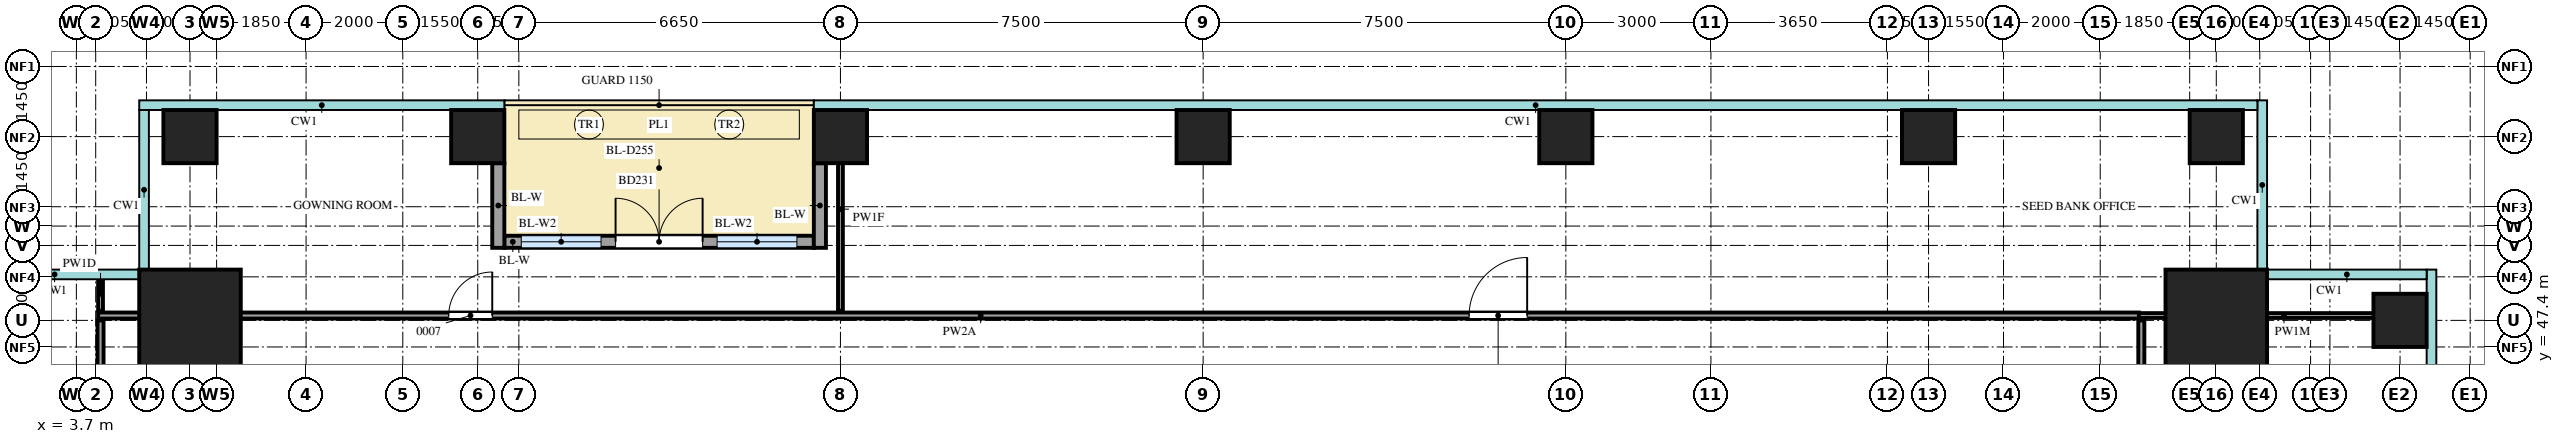
"""IFC4 building model, lengths in metres.
Left out: names, types, materials, properties, quantities, classifications, styles, units other than length and angle.
Written with IfcOpenShell. Run it as: python <this file> out.ifc"""

import sys

from ifc_helpers import new_model, si_unit, direction, frame, frame_2d, origin, origin_2d, place, context, subcontext, project, spatial, rectangle, extrude, source, transform, mapped, element, fill, save


model = new_model("IFC4")
c1 = context("Model", 3, precision=1e-05, world=origin(), true_north=direction((0.0, 1.0)))
c2 = subcontext(c1, "Body", "Model", "MODEL_VIEW")
j1 = project(units=[si_unit("LENGTHUNIT", "METRE"), si_unit("PLANEANGLEUNIT", "RADIAN")], contexts=[c1])
p1 = place(None, origin())
s1 = spatial("IfcSite", under=j1, at=p1, CompositionType="ELEMENT")
p2 = place(p1, origin())
s2 = spatial("IfcBuilding", under=s1, at=p2, CompositionType="ELEMENT")
p3 = place(p2, frame((0.0, 0.0, 110.3)))
s3 = spatial("IfcBuildingStorey", under=s2, at=p3, CompositionType="ELEMENT", Elevation=110.3)
m1 = source(origin(), c2, "Body", "SweptSolid", [
    extrude(rectangle(XDim=2.1, YDim=2.1, at=origin_2d()), origin(), (0.0, 0.0, 1.0), 4.4),
])
for number, where, z_axis, x_axis in (
    (1, (47.95, 47.95, 0.0), (0.0, 0.0, 1.0), (1.0, 0.0, 0.0)),
    (2, (6.05, 47.95, 0.0), (0.0, 0.0, 1.0), (1.0, 0.0, 0.0)),
):
    element("IfcColumn", number, at=place(p3, frame(where, z_axis=z_axis, x_axis=x_axis)), inside=s3, PredefinedType="COLUMN", context=c2, shape_type="MappedRepresentation", body=[
        mapped(m1, transform((0.0, 0.0, 0.0))),
    ])
m2 = source(origin(), c2, "Body", "SweptSolid", [
    extrude(rectangle(XDim=1.1, YDim=1.1, at=origin_2d()), origin(), (0.0, 0.0, 1.0), 4.1),
])
for number, where, z_axis, x_axis in (
    (3, (51.75, 47.95, 0.0), (0.0, 0.0, 1.0), (1.0, 0.0, 0.0)),
    (4, (6.05, 51.75, 0.0), (0.0, 0.0, 1.0), (1.0, 0.0, 0.0)),
    (5, (12.0, 51.75, 0.0), (0.0, 0.0, 1.0), (1.0, 0.0, 0.0)),
    (6, (19.5, 51.75, 0.0), (0.0, 0.0, 1.0), (1.0, 0.0, 0.0)),
    (7, (27.0, 51.75, 0.0), (0.0, 0.0, 1.0), (1.0, 0.0, 0.0)),
    (8, (34.5, 51.75, 0.0), (0.0, 0.0, 1.0), (1.0, 0.0, 0.0)),
    (9, (42.0, 51.75, 0.0), (0.0, 0.0, 1.0), (1.0, 0.0, 0.0)),
    (10, (47.95, 51.75, 0.0), (0.0, 0.0, 1.0), (1.0, 0.0, 0.0)),
):
    element("IfcColumn", number, at=place(p3, frame(where, z_axis=z_axis, x_axis=x_axis)), inside=s3, PredefinedType="COLUMN", context=c2, shape_type="MappedRepresentation", body=[
        mapped(m2, transform((0.0, 0.0, 0.0))),
    ])
m3 = source(origin(), c2, "Body", "SweptSolid", [
    extrude(rectangle(XDim=6.4, YDim=0.25, at=frame_2d((3.2, 0.0))), origin(), (0.0, 0.0, 1.0), 4.1),
])
p4 = place(p3, frame((12.55, 49.575, 0.0), z_axis=(0.0, 0.0, 1.0), x_axis=(1.0, 0.0, 0.0)))
e11 = element("IfcWall", 11, at=p4, inside=s3, PredefinedType="SOLIDWALL", context=c2, shape_type="MappedRepresentation", body=[
    mapped(m3, transform((0.0, 0.0, 0.0))),
])
m4 = source(origin(), c2, "Body", "SweptSolid", [
    extrude(rectangle(XDim=1.65, YDim=2.4, at=frame_2d((0.825, 1.2))), frame((0.0, 0.135, 0.0), z_axis=(0.0, -1.0, 0.0), x_axis=(1.0, 0.0, 0.0)), (0.0, 0.0, 1.0), 0.27),
])
p5 = place(p4, frame((0.35, 0.0, 0.0)))
e12 = element("IfcOpeningElement", 12, at=p5, cuts=e11, PredefinedType="OPENING", context=c2, shape_type="MappedRepresentation", body=[
    mapped(m4, transform((0.0, 0.0, 0.0))),
])
p6 = place(p4, frame((4.4, 0.0, 0.0)))
e13 = element("IfcOpeningElement", 13, at=p6, cuts=e11, PredefinedType="OPENING", context=c2, shape_type="MappedRepresentation", body=[
    mapped(m4, transform((0.0, 0.0, 0.0))),
])
m5 = source(origin(), c2, "Body", "SweptSolid", [
    extrude(rectangle(XDim=1.8, YDim=2.4, at=frame_2d((0.9, 1.2))), frame((0.0, 0.135, 0.0), z_axis=(0.0, -1.0, 0.0), x_axis=(1.0, 0.0, 0.0)), (0.0, 0.0, 1.0), 0.27),
])
p7 = place(p4, frame((2.3, 0.0, 0.0)))
e14 = element("IfcOpeningElement", 14, at=p7, cuts=e11, PredefinedType="OPENING", context=c2, shape_type="MappedRepresentation", body=[
    mapped(m5, transform((0.0, 0.0, 0.0))),
])
m6 = source(origin(), c2, "Body", "SweptSolid", [
    extrude(rectangle(XDim=1.75, YDim=0.25, at=frame_2d((0.875, 0.0))), origin(), (0.0, 0.0, 1.0), 4.1),
])
for number, where, z_axis, x_axis in (
    (15, (12.425, 51.2, 0.0), (0.0, 0.0, 1.0), (0.0, -1.0, 0.0)),
    (16, (19.075, 51.2, 0.0), (0.0, 0.0, 1.0), (0.0, -1.0, 0.0)),
):
    element("IfcWall", number, at=place(p3, frame(where, z_axis=z_axis, x_axis=x_axis)), inside=s3, PredefinedType="SOLIDWALL", context=c2, shape_type="MappedRepresentation", body=[
        mapped(m6, transform((0.0, 0.0, 0.0))),
    ])
m7 = source(origin(), c2, "Body", "SweptSolid", [
    extrude(rectangle(XDim=41.8, YDim=0.125, at=frame_2d((20.9, 0.0))), origin(), (0.0, 0.0, 1.0), 4.2),
])
p8 = place(p3, frame((4.2, 6.15, 0.0), z_axis=(0.0, 0.0, 1.0), x_axis=(0.0, 1.0, 0.0)))
e17 = element("IfcWall", 17, at=p8, inside=s3, PredefinedType="PARTITIONING", context=c2, shape_type="MappedRepresentation", body=[
    mapped(m7, transform((0.0, 0.0, 0.0))),
])
m8 = source(origin(), c2, "Body", "SweptSolid", [
    extrude(rectangle(XDim=0.9, YDim=2.1, at=frame_2d((0.45, 1.05))), frame((0.0, 0.073, 0.0), z_axis=(0.0, -1.0, 0.0), x_axis=(1.0, 0.0, 0.0)), (0.0, 0.0, 1.0), 0.145),
])
p9 = place(p8, frame((7.2, 0.0, 0.0)))
e18 = element("IfcOpeningElement", 18, at=p9, cuts=e17, PredefinedType="OPENING", context=c2, shape_type="MappedRepresentation", body=[
    mapped(m8, transform((0.0, 0.0, 0.0))),
])
p10 = place(p8, frame((21.8, 0.0, 0.0)))
e19 = element("IfcOpeningElement", 19, at=p10, cuts=e17, PredefinedType="OPENING", context=c2, shape_type="MappedRepresentation", body=[
    mapped(m8, transform((0.0, 0.0, 0.0))),
])
p11 = place(p8, frame((33.3, 0.0, 0.0)))
e20 = element("IfcOpeningElement", 20, at=p11, cuts=e17, PredefinedType="OPENING", context=c2, shape_type="MappedRepresentation", body=[
    mapped(m8, transform((0.0, 0.0, 0.0))),
])
m9 = source(origin(), c2, "Body", "SweptSolid", [
    extrude(rectangle(XDim=37.65, YDim=0.125, at=frame_2d((18.825, 0.0))), origin(), (0.0, 0.0, 1.0), 4.2),
])
p12 = place(p3, frame((46.4, 10.3, 0.0), z_axis=(0.0, 0.0, 1.0), x_axis=(0.0, 1.0, 0.0)))
e21 = element("IfcWall", 21, at=p12, inside=s3, PredefinedType="PARTITIONING", context=c2, shape_type="MappedRepresentation", body=[
    mapped(m9, transform((0.0, 0.0, 0.0))),
])
m10 = source(origin(), c2, "Body", "SweptSolid", [
    extrude(rectangle(XDim=1.2, YDim=2.1, at=frame_2d((0.6, 1.05))), frame((0.0, 0.073, 0.0), z_axis=(0.0, -1.0, 0.0), x_axis=(1.0, 0.0, 0.0)), (0.0, 0.0, 1.0), 0.145),
])
p13 = place(p12, frame((7.85, 0.0, 0.0)))
e22 = element("IfcOpeningElement", 22, at=p13, cuts=e21, PredefinedType="OPENING", context=c2, shape_type="MappedRepresentation", body=[
    mapped(m10, transform((0.0, 0.0, 0.0))),
])
p14 = place(p12, frame((23.6, 0.0, 0.0)))
e23 = element("IfcOpeningElement", 23, at=p14, cuts=e21, PredefinedType="OPENING", context=c2, shape_type="MappedRepresentation", body=[
    mapped(m10, transform((0.0, 0.0, 0.0))),
])
p15 = place(p12, frame((32.9, 0.0, 0.0)))
e24 = element("IfcOpeningElement", 24, at=p15, cuts=e21, PredefinedType="OPENING", context=c2, shape_type="MappedRepresentation", body=[
    mapped(m10, transform((0.0, 0.0, 0.0))),
])
m11 = source(origin(), c2, "Body", "SweptSolid", [
    extrude(rectangle(XDim=42.2, YDim=0.125, at=frame_2d((21.1, 0.0))), origin(), (0.0, 0.0, 1.0), 3.55),
])
p16 = place(p3, frame((4.15, 48.05, 0.0), z_axis=(0.0, 0.0, 1.0), x_axis=(1.0, 0.0, 0.0)))
e25 = element("IfcWall", 25, at=p16, inside=s3, PredefinedType="PARTITIONING", context=c2, shape_type="MappedRepresentation", body=[
    mapped(m11, transform((0.0, 0.0, 0.0))),
])
p17 = place(p16, frame((7.25, 0.0, 0.0)))
e26 = element("IfcOpeningElement", 26, at=p17, cuts=e25, PredefinedType="OPENING", context=c2, shape_type="MappedRepresentation", body=[
    mapped(m8, transform((0.0, 0.0, 0.0))),
])
p18 = place(p16, frame((28.35, 0.0, 0.0)))
e27 = element("IfcOpeningElement", 27, at=p18, cuts=e25, PredefinedType="OPENING", context=c2, shape_type="MappedRepresentation", body=[
    mapped(m10, transform((0.0, 0.0, 0.0))),
])
m12 = source(origin(), c2, "Body", "SweptSolid", [
    extrude(rectangle(XDim=6.0, YDim=0.1, at=frame_2d((3.0, 0.0))), origin(), (0.0, 0.0, 1.0), 3.55),
])
p19 = place(p3, frame((46.35, 48.05, 0.0), z_axis=(0.0, 0.0, 1.0), x_axis=(1.0, 0.0, 0.0)))
e28 = element("IfcWall", 28, at=p19, inside=s3, PredefinedType="PARTITIONING", context=c2, shape_type="MappedRepresentation", body=[
    mapped(m12, transform((0.0, 0.0, 0.0))),
])
m13 = source(origin(), c2, "Body", "SweptSolid", [
    extrude(rectangle(XDim=0.7, YDim=0.1, at=frame_2d((0.35, 0.0))), origin(), (0.0, 0.0, 1.0), 4.2),
])
p20 = place(p3, frame((4.2, 48.15, 0.0), z_axis=(0.0, 0.0, 1.0), x_axis=(0.0, 1.0, 0.0)))
e29 = element("IfcWall", 29, at=p20, inside=s3, PredefinedType="PARTITIONING", context=c2, shape_type="MappedRepresentation", body=[
    mapped(m13, transform((0.0, 0.0, 0.0))),
])
m14 = source(origin(), c2, "Body", "SweptSolid", [
    extrude(rectangle(XDim=4.2, YDim=0.1, at=frame_2d((2.1, 0.0))), origin(), (0.0, 0.0, 1.0), 3.77),
])
p21 = place(p3, frame((19.5, 48.15, 0.0), z_axis=(0.0, 0.0, 1.0), x_axis=(0.0, 1.0, 0.0)))
e30 = element("IfcWall", 30, at=p21, inside=s3, PredefinedType="PARTITIONING", context=c2, shape_type="MappedRepresentation", body=[
    mapped(m14, transform((0.0, 0.0, 0.0))),
])
m15 = source(origin(), c2, "Body", "SweptSolid", [
    extrude(rectangle(XDim=1.65, YDim=2.4, at=frame_2d((0.825, 1.2))), frame((0.0, 0.03, 0.0), z_axis=(0.0, -1.0, 0.0), x_axis=(1.0, 0.0, 0.0)), (0.0, 0.0, 1.0), 0.06),
])
p22 = place(p5, origin())
e31 = element("IfcWindow", 31, at=p22, inside=s3, PartitioningType="SINGLE_PANEL", PredefinedType="WINDOW", context=c2, shape_type="MappedRepresentation", body=[
    mapped(m15, transform((0.0, 0.0, 0.0))),
])
fill(e12, e31)
p23 = place(p6, origin())
e32 = element("IfcWindow", 32, at=p23, inside=s3, PartitioningType="SINGLE_PANEL", PredefinedType="WINDOW", context=c2, shape_type="MappedRepresentation", body=[
    mapped(m15, transform((0.0, 0.0, 0.0))),
])
fill(e13, e32)
m16 = source(origin(), c2, "Body", "SweptSolid", [
    extrude(rectangle(XDim=1.8, YDim=2.4, at=frame_2d((0.9, 1.2))), frame((0.0, 0.025, 0.0), z_axis=(0.0, -1.0, 0.0), x_axis=(1.0, 0.0, 0.0)), (0.0, 0.0, 1.0), 0.05),
])
p24 = place(p7, origin())
e33 = element("IfcDoor", 33, at=p24, inside=s3, OperationType="DOUBLE_DOOR_DOUBLE_SWING", PredefinedType="DOOR", context=c2, shape_type="MappedRepresentation", body=[
    mapped(m16, transform((0.0, 0.0, 0.0))),
])
fill(e14, e33)
m17 = source(origin(), c2, "Body", "SweptSolid", [
    extrude(rectangle(XDim=0.9, YDim=2.1, at=frame_2d((0.45, 1.05))), frame((0.0, 0.025, 0.0), z_axis=(0.0, -1.0, 0.0), x_axis=(1.0, 0.0, 0.0)), (0.0, 0.0, 1.0), 0.05),
])
p25 = place(p17, origin())
e34 = element("IfcDoor", 34, at=p25, inside=s3, OperationType="SINGLE_SWING_LEFT", PredefinedType="DOOR", context=c2, shape_type="MappedRepresentation", body=[
    mapped(m17, transform((0.0, 0.0, 0.0))),
])
fill(e26, e34)
m18 = source(origin(), c2, "Body", "SweptSolid", [
    extrude(rectangle(XDim=1.2, YDim=2.1, at=frame_2d((0.6, 1.05))), frame((0.0, 0.025, 0.0), z_axis=(0.0, -1.0, 0.0), x_axis=(1.0, 0.0, 0.0)), (0.0, 0.0, 1.0), 0.05),
])
p26 = place(p18, origin())
e35 = element("IfcDoor", 35, at=p26, inside=s3, OperationType="SINGLE_SWING_LEFT", PredefinedType="DOOR", context=c2, shape_type="MappedRepresentation", body=[
    mapped(m18, transform((0.0, 0.0, 0.0))),
])
fill(e27, e35)
save(model, sys.argv[1])
